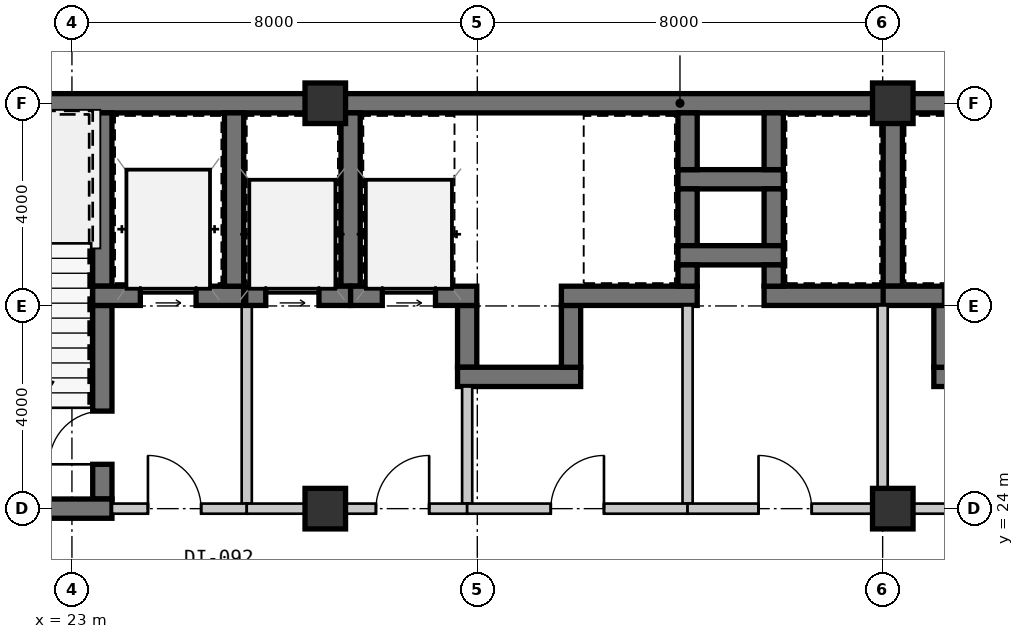
"""IFC4 building model, lengths in metres.
Left out: names, types, materials, properties, quantities, classifications, styles, units other than length and angle.
Written with IfcOpenShell. Run it as: python <this file> out.ifc"""

import sys

from ifc_helpers import new_model, si_unit, direction, frame, frame_2d, origin, origin_2d, place, context, subcontext, project, spatial, rectangle, extrude, source, transform, mapped, element, fill, save


model = new_model("IFC4")
c1 = context("Model", 3, precision=1e-05, world=origin(), true_north=direction((0.0, 1.0)))
c2 = subcontext(c1, "Body", "Model", "MODEL_VIEW")
j1 = project(units=[si_unit("LENGTHUNIT", "METRE"), si_unit("PLANEANGLEUNIT", "RADIAN")], contexts=[c1])
p1 = place(None, origin())
s1 = spatial("IfcSite", under=j1, at=p1, CompositionType="ELEMENT")
p2 = place(p1, origin())
s2 = spatial("IfcBuilding", under=s1, at=p2, CompositionType="ELEMENT")
p3 = place(p2, frame((0.0, 0.0, 19.95)))
s3 = spatial("IfcBuildingStorey", under=s2, at=p3, CompositionType="ELEMENT", Elevation=19.95)
m1 = source(origin(), c2, "Body", "SweptSolid", [
    extrude(rectangle(XDim=0.8, YDim=0.8, at=origin_2d()), origin(), (0.0, 0.0, 1.0), 3.15),
])
for number, where, z_axis, x_axis in (
    (1, (28.0, 24.0, 0.0), (0.0, 0.0, 1.0), (1.0, 0.0, 0.0)),
    (2, (39.2, 24.0, 0.0), (0.0, 0.0, 1.0), (1.0, 0.0, 0.0)),
    (3, (28.0, 32.0, 0.0), (0.0, 0.0, 1.0), (1.0, 0.0, 0.0)),
    (4, (39.2, 32.0, 0.0), (0.0, 0.0, 1.0), (1.0, 0.0, 0.0)),
):
    element("IfcColumn", number, at=place(p3, frame(where, z_axis=z_axis, x_axis=x_axis)), inside=s3, PredefinedType="COLUMN", context=c2, shape_type="MappedRepresentation", body=[
        mapped(m1, transform((0.0, 0.0, 0.0), scale=1.0)),
    ])
m2 = source(origin(), c2, "Body", "SweptSolid", [
    extrude(rectangle(XDim=9.19, YDim=0.38, at=frame_2d((4.595, 0.0))), origin(), (0.0, 0.0, 1.0), 2.93),
])
p4 = place(p3, frame((18.81, 32.0, 0.0), z_axis=(0.0, 0.0, 1.0), x_axis=(1.0, 0.0, 0.0)))
e5 = element("IfcWall", 5, at=p4, inside=s3, PredefinedType="SHEAR", context=c2, shape_type="MappedRepresentation", body=[
    mapped(m2, transform((0.0, 0.0, 0.0), scale=1.0)),
])
m3 = source(origin(), c2, "Body", "SweptSolid", [
    extrude(rectangle(XDim=11.2, YDim=0.38, at=frame_2d((5.6, 0.0))), origin(), (0.0, 0.0, 1.0), 2.93),
])
p5 = place(p3, frame((28.0, 32.0, 0.0), z_axis=(0.0, 0.0, 1.0), x_axis=(1.0, 0.0, 0.0)))
e6 = element("IfcWall", 6, at=p5, inside=s3, PredefinedType="SHEAR", context=c2, shape_type="MappedRepresentation", body=[
    mapped(m3, transform((0.0, 0.0, 0.0), scale=1.0)),
])
m4 = source(origin(), c2, "Body", "SweptSolid", [
    extrude(rectangle(XDim=11.99, YDim=0.38, at=frame_2d((5.995, 0.0))), origin(), (0.0, 0.0, 1.0), 2.93),
])
p6 = place(p3, frame((39.2, 32.0, 0.0), z_axis=(0.0, 0.0, 1.0), x_axis=(1.0, 0.0, 0.0)))
e7 = element("IfcWall", 7, at=p6, inside=s3, PredefinedType="SHEAR", context=c2, shape_type="MappedRepresentation", body=[
    mapped(m4, transform((0.0, 0.0, 0.0), scale=1.0)),
])
m5 = source(origin(), c2, "Body", "SweptSolid", [
    extrude(rectangle(XDim=3.42, YDim=0.38, at=frame_2d((1.71, 0.0))), origin(), (0.0, 0.0, 1.0), 2.93),
])
p7 = place(p3, frame((23.6, 28.39, 0.0), z_axis=(0.0, 0.0, 1.0), x_axis=(0.0, 1.0, 0.0)))
e8 = element("IfcWall", 8, at=p7, inside=s3, PredefinedType="SHEAR", context=c2, shape_type="MappedRepresentation", body=[
    mapped(m5, transform((0.0, 0.0, 0.0), scale=1.0)),
])
m6 = source(origin(), c2, "Body", "SweptSolid", [
    extrude(rectangle(XDim=3.82, YDim=0.38, at=frame_2d((1.91, 0.0))), origin(), (0.0, 0.0, 1.0), 2.93),
])
p8 = place(p3, frame((23.6, 24.19, 0.0), z_axis=(0.0, 0.0, 1.0), x_axis=(0.0, 1.0, 0.0)))
e9 = element("IfcWall", 9, at=p8, inside=s3, PredefinedType="SHEAR", context=c2, shape_type="MappedRepresentation", body=[
    mapped(m6, transform((0.0, 0.0, 0.0), scale=1.0)),
])
m7 = source(origin(), c2, "Body", "SweptSolid", [
    extrude(rectangle(XDim=1.05, YDim=2.1, at=frame_2d((0.525, 1.05))), frame((0.0, 0.2, 0.0), z_axis=(0.0, -1.0, 0.0), x_axis=(1.0, 0.0, 0.0)), (0.0, 0.0, 1.0), 0.4),
])
p9 = place(p8, frame((0.685, 0.0, 0.0)))
e10 = element("IfcOpeningElement", 10, at=p9, cuts=e9, PredefinedType="OPENING", context=c2, shape_type="MappedRepresentation", body=[
    mapped(m7, transform((0.0, 0.0, 0.0), scale=1.0)),
])
m8 = source(origin(), c2, "Body", "SweptSolid", [
    extrude(rectangle(XDim=4.98, YDim=0.38, at=frame_2d((2.49, 0.0))), origin(), (0.0, 0.0, 1.0), 2.93),
])
p10 = place(p3, frame((18.81, 24.0, 0.0), z_axis=(0.0, 0.0, 1.0), x_axis=(1.0, 0.0, 0.0)))
e11 = element("IfcWall", 11, at=p10, inside=s3, PredefinedType="SHEAR", context=c2, shape_type="MappedRepresentation", body=[
    mapped(m8, transform((0.0, 0.0, 0.0), scale=1.0)),
])
m9 = source(origin(), c2, "Body", "SweptSolid", [
    extrude(rectangle(XDim=2.98, YDim=0.38, at=frame_2d((1.49, 0.0))), origin(), (0.0, 0.0, 1.0), 2.93),
])
p11 = place(p3, frame((23.41, 28.2, 0.0), z_axis=(0.0, 0.0, 1.0), x_axis=(1.0, 0.0, 0.0)))
e12 = element("IfcWall", 12, at=p11, inside=s3, PredefinedType="SHEAR", context=c2, shape_type="MappedRepresentation", body=[
    mapped(m9, transform((0.0, 0.0, 0.0), scale=1.0)),
])
m10 = source(origin(), c2, "Body", "SweptSolid", [
    extrude(rectangle(XDim=1.1, YDim=2.15, at=frame_2d((0.55, 1.075))), frame((0.0, 0.2, 0.0), z_axis=(0.0, -1.0, 0.0), x_axis=(1.0, 0.0, 0.0)), (0.0, 0.0, 1.0), 0.4),
])
p12 = place(p11, frame((0.94, 0.0, 0.0)))
e13 = element("IfcOpeningElement", 13, at=p12, cuts=e12, PredefinedType="OPENING", context=c2, shape_type="MappedRepresentation", body=[
    mapped(m10, transform((0.0, 0.0, 0.0), scale=1.0)),
])
p13 = place(p3, frame((26.2, 28.39, 0.0), z_axis=(0.0, 0.0, 1.0), x_axis=(0.0, 1.0, 0.0)))
e14 = element("IfcWall", 14, at=p13, inside=s3, PredefinedType="SHEAR", context=c2, shape_type="MappedRepresentation", body=[
    mapped(m5, transform((0.0, 0.0, 0.0), scale=1.0)),
])
m11 = source(origin(), c2, "Body", "SweptSolid", [
    extrude(rectangle(XDim=3.91, YDim=0.2, at=frame_2d((1.955, 0.0))), origin(), (0.0, 0.0, 1.0), 2.93),
])
p14 = place(p3, frame((26.45, 24.1, 0.0), z_axis=(0.0, 0.0, 1.0), x_axis=(0.0, 1.0, 0.0)))
e15 = element("IfcWall", 15, at=p14, inside=s3, PredefinedType="SOLIDWALL", context=c2, shape_type="MappedRepresentation", body=[
    mapped(m11, transform((0.0, 0.0, 0.0), scale=1.0)),
])
m12 = source(origin(), c2, "Body", "SweptSolid", [
    extrude(rectangle(XDim=2.66, YDim=0.2, at=frame_2d((1.33, 0.0))), origin(), (0.0, 0.0, 1.0), 2.47),
])
p15 = place(p3, frame((23.79, 24.0, 0.0), z_axis=(0.0, 0.0, 1.0), x_axis=(1.0, 0.0, 0.0)))
e16 = element("IfcWall", 16, at=p15, inside=s3, PredefinedType="SOLIDWALL", context=c2, shape_type="MappedRepresentation", body=[
    mapped(m12, transform((0.0, 0.0, 0.0), scale=1.0)),
])
m13 = source(origin(), c2, "Body", "SweptSolid", [
    extrude(rectangle(XDim=1.05, YDim=2.1, at=frame_2d((0.525, 1.05))), frame((0.0, 0.11, 0.0), z_axis=(0.0, -1.0, 0.0), x_axis=(1.0, 0.0, 0.0)), (0.0, 0.0, 1.0), 0.22),
])
p16 = place(p15, frame((0.71, 0.0, 0.0)))
e17 = element("IfcOpeningElement", 17, at=p16, cuts=e16, PredefinedType="OPENING", context=c2, shape_type="MappedRepresentation", body=[
    mapped(m13, transform((0.0, 0.0, 0.0), scale=1.0)),
])
m14 = source(origin(), c2, "Body", "SweptSolid", [
    extrude(rectangle(XDim=2.08, YDim=0.38, at=frame_2d((1.04, 0.0))), origin(), (0.0, 0.0, 1.0), 2.93),
])
p17 = place(p3, frame((34.96, 30.5, 0.0), z_axis=(0.0, 0.0, 1.0), x_axis=(1.0, 0.0, 0.0)))
e18 = element("IfcWall", 18, at=p17, inside=s3, PredefinedType="SHEAR", context=c2, shape_type="MappedRepresentation", body=[
    mapped(m14, transform((0.0, 0.0, 0.0), scale=1.0)),
])
m15 = source(origin(), c2, "Body", "SweptSolid", [
    extrude(rectangle(XDim=1.12, YDim=0.38, at=frame_2d((0.56, 0.0))), origin(), (0.0, 0.0, 1.0), 2.93),
])
for number, where, z_axis, x_axis in (
    (19, (35.15, 31.81, 0.0), (0.0, 0.0, 1.0), (0.0, -1.0, 0.0)),
    (20, (36.85, 30.69, 0.0), (0.0, 0.0, 1.0), (0.0, 1.0, 0.0)),
    (21, (35.15, 30.31, 0.0), (0.0, 0.0, 1.0), (0.0, -1.0, 0.0)),
    (22, (36.85, 29.19, 0.0), (0.0, 0.0, 1.0), (0.0, 1.0, 0.0)),
):
    element("IfcWall", number, at=place(p3, frame(where, z_axis=z_axis, x_axis=x_axis)), inside=s3, PredefinedType="SHEAR", context=c2, shape_type="MappedRepresentation", body=[
        mapped(m15, transform((0.0, 0.0, 0.0), scale=1.0)),
    ])
p18 = place(p3, frame((34.96, 29.0, 0.0), z_axis=(0.0, 0.0, 1.0), x_axis=(1.0, 0.0, 0.0)))
e23 = element("IfcWall", 23, at=p18, inside=s3, PredefinedType="SHEAR", context=c2, shape_type="MappedRepresentation", body=[
    mapped(m14, transform((0.0, 0.0, 0.0), scale=1.0)),
])
m16 = source(origin(), c2, "Body", "SweptSolid", [
    extrude(rectangle(XDim=1.22, YDim=0.38, at=frame_2d((0.61, 0.0))), origin(), (0.0, 0.0, 1.0), 2.93),
])
p19 = place(p3, frame((30.8, 28.01, 0.0), z_axis=(0.0, 0.0, 1.0), x_axis=(0.0, -1.0, 0.0)))
e24 = element("IfcWall", 24, at=p19, inside=s3, PredefinedType="SHEAR", context=c2, shape_type="MappedRepresentation", body=[
    mapped(m16, transform((0.0, 0.0, 0.0), scale=1.0)),
])
m17 = source(origin(), c2, "Body", "SweptSolid", [
    extrude(rectangle(XDim=2.43, YDim=0.38, at=frame_2d((1.215, 0.0))), origin(), (0.0, 0.0, 1.0), 2.93),
])
p20 = place(p3, frame((30.61, 26.6, 0.0), z_axis=(0.0, 0.0, 1.0), x_axis=(1.0, 0.0, 0.0)))
e25 = element("IfcWall", 25, at=p20, inside=s3, PredefinedType="SHEAR", context=c2, shape_type="MappedRepresentation", body=[
    mapped(m17, transform((0.0, 0.0, 0.0), scale=1.0)),
])
p21 = place(p3, frame((32.85, 26.79, 0.0), z_axis=(0.0, 0.0, 1.0), x_axis=(0.0, 1.0, 0.0)))
e26 = element("IfcWall", 26, at=p21, inside=s3, PredefinedType="SHEAR", context=c2, shape_type="MappedRepresentation", body=[
    mapped(m16, transform((0.0, 0.0, 0.0), scale=1.0)),
])
m18 = source(origin(), c2, "Body", "SweptSolid", [
    extrude(rectangle(XDim=1.32, YDim=0.38, at=frame_2d((0.66, 0.0))), origin(), (0.0, 0.0, 1.0), 2.93),
])
p22 = place(p3, frame((41.52, 28.2, 0.0), z_axis=(0.0, 0.0, 1.0), x_axis=(-1.0, 0.0, 0.0)))
e27 = element("IfcWall", 27, at=p22, inside=s3, PredefinedType="SHEAR", context=c2, shape_type="MappedRepresentation", body=[
    mapped(m18, transform((0.0, 0.0, 0.0), scale=1.0)),
])
m19 = source(origin(), c2, "Body", "SweptSolid", [
    extrude(rectangle(XDim=2.33, YDim=0.38, at=frame_2d((1.165, 0.0))), origin(), (0.0, 0.0, 1.0), 2.93),
])
p23 = place(p3, frame((40.01, 26.6, 0.0), z_axis=(0.0, 0.0, 1.0), x_axis=(1.0, 0.0, 0.0)))
e28 = element("IfcWall", 28, at=p23, inside=s3, PredefinedType="SHEAR", context=c2, shape_type="MappedRepresentation", body=[
    mapped(m19, transform((0.0, 0.0, 0.0), scale=1.0)),
])
p24 = place(p3, frame((40.2, 28.01, 0.0), z_axis=(0.0, 0.0, 1.0), x_axis=(0.0, -1.0, 0.0)))
e29 = element("IfcWall", 29, at=p24, inside=s3, PredefinedType="SHEAR", context=c2, shape_type="MappedRepresentation", body=[
    mapped(m16, transform((0.0, 0.0, 0.0), scale=1.0)),
])
p25 = place(p3, frame((28.5, 28.39, 0.0), z_axis=(0.0, 0.0, 1.0), x_axis=(0.0, 1.0, 0.0)))
e30 = element("IfcWall", 30, at=p25, inside=s3, PredefinedType="SHEAR", context=c2, shape_type="MappedRepresentation", body=[
    mapped(m5, transform((0.0, 0.0, 0.0), scale=1.0)),
])
m20 = source(origin(), c2, "Body", "SweptSolid", [
    extrude(rectangle(XDim=2.07, YDim=0.38, at=frame_2d((1.035, 0.0))), origin(), (0.0, 0.0, 1.0), 2.93),
])
p26 = place(p3, frame((26.43, 28.2, 0.0), z_axis=(0.0, 0.0, 1.0), x_axis=(1.0, 0.0, 0.0)))
e31 = element("IfcWall", 31, at=p26, inside=s3, PredefinedType="SHEAR", context=c2, shape_type="MappedRepresentation", body=[
    mapped(m20, transform((0.0, 0.0, 0.0), scale=1.0)),
])
m21 = source(origin(), c2, "Body", "SweptSolid", [
    extrude(rectangle(XDim=1.05, YDim=2.15, at=frame_2d((0.525, 1.075))), frame((0.0, 0.2, 0.0), z_axis=(0.0, -1.0, 0.0), x_axis=(1.0, 0.0, 0.0)), (0.0, 0.0, 1.0), 0.4),
])
p27 = place(p26, frame((0.395, 0.0, 0.0)))
e32 = element("IfcOpeningElement", 32, at=p27, cuts=e31, PredefinedType="OPENING", context=c2, shape_type="MappedRepresentation", body=[
    mapped(m21, transform((0.0, 0.0, 0.0), scale=1.0)),
])
m22 = source(origin(), c2, "Body", "SweptSolid", [
    extrude(rectangle(XDim=2.49, YDim=0.38, at=frame_2d((1.245, 0.0))), origin(), (0.0, 0.0, 1.0), 2.93),
])
p28 = place(p3, frame((28.5, 28.2, 0.0), z_axis=(0.0, 0.0, 1.0), x_axis=(1.0, 0.0, 0.0)))
e33 = element("IfcWall", 33, at=p28, inside=s3, PredefinedType="SHEAR", context=c2, shape_type="MappedRepresentation", body=[
    mapped(m22, transform((0.0, 0.0, 0.0), scale=1.0)),
])
p29 = place(p28, frame((0.625, 0.0, 0.0)))
e34 = element("IfcOpeningElement", 34, at=p29, cuts=e33, PredefinedType="OPENING", context=c2, shape_type="MappedRepresentation", body=[
    mapped(m21, transform((0.0, 0.0, 0.0), scale=1.0)),
])
m23 = source(origin(), c2, "Body", "SweptSolid", [
    extrude(rectangle(XDim=2.31, YDim=0.2, at=frame_2d((1.155, 0.0))), origin(), (0.0, 0.0, 1.0), 2.93),
])
p30 = place(p3, frame((30.8, 26.41, 0.0), z_axis=(0.0, 0.0, 1.0), x_axis=(0.0, -1.0, 0.0)))
e35 = element("IfcWall", 35, at=p30, inside=s3, PredefinedType="SOLIDWALL", context=c2, shape_type="MappedRepresentation", body=[
    mapped(m23, transform((0.0, 0.0, 0.0), scale=1.0)),
])
m24 = source(origin(), c2, "Body", "SweptSolid", [
    extrude(rectangle(XDim=4.35, YDim=0.2, at=frame_2d((2.175, 0.0))), origin(), (0.0, 0.0, 1.0), 2.47),
])
p31 = place(p3, frame((30.8, 24.0, 0.0), z_axis=(0.0, 0.0, 1.0), x_axis=(-1.0, 0.0, 0.0)))
e36 = element("IfcWall", 36, at=p31, inside=s3, PredefinedType="SOLIDWALL", context=c2, shape_type="MappedRepresentation", body=[
    mapped(m24, transform((0.0, 0.0, 0.0), scale=1.0)),
])
p32 = place(p31, frame((0.75, 0.0, 0.0)))
e37 = element("IfcOpeningElement", 37, at=p32, cuts=e36, PredefinedType="OPENING", context=c2, shape_type="MappedRepresentation", body=[
    mapped(m13, transform((0.0, 0.0, 0.0), scale=1.0)),
])
m25 = source(origin(), c2, "Body", "SweptSolid", [
    extrude(rectangle(XDim=2.68, YDim=0.38, at=frame_2d((1.34, 0.0))), origin(), (0.0, 0.0, 1.0), 2.93),
])
p33 = place(p3, frame((32.66, 28.2, 0.0), z_axis=(0.0, 0.0, 1.0), x_axis=(1.0, 0.0, 0.0)))
e38 = element("IfcWall", 38, at=p33, inside=s3, PredefinedType="SHEAR", context=c2, shape_type="MappedRepresentation", body=[
    mapped(m25, transform((0.0, 0.0, 0.0), scale=1.0)),
])
m26 = source(origin(), c2, "Body", "SweptSolid", [
    extrude(rectangle(XDim=0.42, YDim=0.38, at=frame_2d((0.21, 0.0))), origin(), (0.0, 0.0, 1.0), 2.93),
])
p34 = place(p3, frame((35.15, 28.39, 0.0), z_axis=(0.0, 0.0, 1.0), x_axis=(0.0, 1.0, 0.0)))
e39 = element("IfcWall", 39, at=p34, inside=s3, PredefinedType="SHEAR", context=c2, shape_type="MappedRepresentation", body=[
    mapped(m26, transform((0.0, 0.0, 0.0), scale=1.0)),
])
p35 = place(p3, frame((39.2, 28.39, 0.0), z_axis=(0.0, 0.0, 1.0), x_axis=(0.0, 1.0, 0.0)))
e40 = element("IfcWall", 40, at=p35, inside=s3, PredefinedType="SHEAR", context=c2, shape_type="MappedRepresentation", body=[
    mapped(m5, transform((0.0, 0.0, 0.0), scale=1.0)),
])
m27 = source(origin(), c2, "Body", "SweptSolid", [
    extrude(rectangle(XDim=2.36, YDim=0.38, at=frame_2d((1.18, 0.0))), origin(), (0.0, 0.0, 1.0), 2.93),
])
p36 = place(p3, frame((36.66, 28.2, 0.0), z_axis=(0.0, 0.0, 1.0), x_axis=(1.0, 0.0, 0.0)))
e41 = element("IfcWall", 41, at=p36, inside=s3, PredefinedType="SHEAR", context=c2, shape_type="MappedRepresentation", body=[
    mapped(m27, transform((0.0, 0.0, 0.0), scale=1.0)),
])
p37 = place(p3, frame((36.85, 28.81, 0.0), z_axis=(0.0, 0.0, 1.0), x_axis=(0.0, -1.0, 0.0)))
e42 = element("IfcWall", 42, at=p37, inside=s3, PredefinedType="SHEAR", context=c2, shape_type="MappedRepresentation", body=[
    mapped(m26, transform((0.0, 0.0, 0.0), scale=1.0)),
])
m28 = source(origin(), c2, "Body", "SweptSolid", [
    extrude(rectangle(XDim=1.21, YDim=0.38, at=frame_2d((0.605, 0.0))), origin(), (0.0, 0.0, 1.0), 2.93),
])
p38 = place(p3, frame((39.01, 28.2, 0.0), z_axis=(0.0, 0.0, 1.0), x_axis=(1.0, 0.0, 0.0)))
e43 = element("IfcWall", 43, at=p38, inside=s3, PredefinedType="SHEAR", context=c2, shape_type="MappedRepresentation", body=[
    mapped(m28, transform((0.0, 0.0, 0.0), scale=1.0)),
])
p39 = place(p3, frame((35.15, 28.01, 0.0), z_axis=(0.0, 0.0, 1.0), x_axis=(0.0, -1.0, 0.0)))
e44 = element("IfcWall", 44, at=p39, inside=s3, PredefinedType="SOLIDWALL", context=c2, shape_type="MappedRepresentation", body=[
    mapped(m11, transform((0.0, 0.0, 0.0), scale=1.0)),
])
m29 = source(origin(), c2, "Body", "SweptSolid", [
    extrude(rectangle(XDim=4.35, YDim=0.2, at=frame_2d((2.175, 0.0))), origin(), (0.0, 0.0, 1.0), 2.47),
])
p40 = place(p3, frame((35.15, 24.0, 0.0), z_axis=(0.0, 0.0, 1.0), x_axis=(-1.0, 0.0, 0.0)))
e45 = element("IfcWall", 45, at=p40, inside=s3, PredefinedType="SOLIDWALL", context=c2, shape_type="MappedRepresentation", body=[
    mapped(m29, transform((0.0, 0.0, 0.0), scale=1.0)),
])
p41 = place(p40, frame((1.65, 0.0, 0.0)))
e46 = element("IfcOpeningElement", 46, at=p41, cuts=e45, PredefinedType="OPENING", context=c2, shape_type="MappedRepresentation", body=[
    mapped(m13, transform((0.0, 0.0, 0.0), scale=1.0)),
])
p42 = place(p3, frame((39.0, 28.01, 0.0), z_axis=(0.0, 0.0, 1.0), x_axis=(0.0, -1.0, 0.0)))
e47 = element("IfcWall", 47, at=p42, inside=s3, PredefinedType="SOLIDWALL", context=c2, shape_type="MappedRepresentation", body=[
    mapped(m11, transform((0.0, 0.0, 0.0), scale=1.0)),
])
m30 = source(origin(), c2, "Body", "SweptSolid", [
    extrude(rectangle(XDim=3.85, YDim=0.2, at=frame_2d((1.925, 0.0))), origin(), (0.0, 0.0, 1.0), 2.47),
])
p43 = place(p3, frame((39.0, 24.0, 0.0), z_axis=(0.0, 0.0, 1.0), x_axis=(-1.0, 0.0, 0.0)))
e48 = element("IfcWall", 48, at=p43, inside=s3, PredefinedType="SOLIDWALL", context=c2, shape_type="MappedRepresentation", body=[
    mapped(m30, transform((0.0, 0.0, 0.0), scale=1.0)),
])
p44 = place(p43, frame((1.4, 0.0, 0.0)))
e49 = element("IfcOpeningElement", 49, at=p44, cuts=e48, PredefinedType="OPENING", context=c2, shape_type="MappedRepresentation", body=[
    mapped(m13, transform((0.0, 0.0, 0.0), scale=1.0)),
])
m31 = source(origin(), c2, "Body", "SweptSolid", [
    extrude(rectangle(XDim=4.55, YDim=0.2, at=frame_2d((2.275, 0.0))), origin(), (0.0, 0.0, 1.0), 2.397),
])
p45 = place(p3, frame((43.55, 24.0, 0.0), z_axis=(0.0, 0.0, 1.0), x_axis=(-1.0, 0.0, 0.0)))
e50 = element("IfcWall", 50, at=p45, inside=s3, PredefinedType="SOLIDWALL", context=c2, shape_type="MappedRepresentation", body=[
    mapped(m31, transform((0.0, 0.0, 0.0), scale=1.0)),
])
p46 = place(p45, frame((1.75, 0.0, 0.0)))
e51 = element("IfcOpeningElement", 51, at=p46, cuts=e50, PredefinedType="OPENING", context=c2, shape_type="MappedRepresentation", body=[
    mapped(m13, transform((0.0, 0.0, 0.0), scale=1.0)),
])
m32 = source(origin(), c2, "Body", "SweptSolid", [
    extrude(rectangle(XDim=1.05, YDim=2.1, at=frame_2d((0.525, 1.05))), frame((0.0, 0.025, 0.0), z_axis=(0.0, -1.0, 0.0), x_axis=(1.0, 0.0, 0.0)), (0.0, 0.0, 1.0), 0.05),
])
p47 = place(p9, origin())
e52 = element("IfcDoor", 52, at=p47, inside=s3, OperationType="SINGLE_SWING_LEFT", PredefinedType="DOOR", context=c2, shape_type="MappedRepresentation", body=[
    mapped(m32, transform((0.0, 0.0, 0.0), scale=1.0)),
])
fill(e10, e52)
m33 = source(origin(), c2, "Body", "SweptSolid", [
    extrude(rectangle(XDim=1.1, YDim=2.15, at=frame_2d((0.55, 1.075))), frame((0.0, 0.025, 0.0), z_axis=(0.0, -1.0, 0.0), x_axis=(1.0, 0.0, 0.0)), (0.0, 0.0, 1.0), 0.05),
])
p48 = place(p12, origin())
e53 = element("IfcDoor", 53, at=p48, inside=s3, OperationType="SLIDING_TO_LEFT", PredefinedType="DOOR", context=c2, shape_type="MappedRepresentation", body=[
    mapped(m33, transform((0.0, 0.0, 0.0), scale=1.0)),
])
fill(e13, e53)
p49 = place(p16, origin())
e54 = element("IfcDoor", 54, at=p49, inside=s3, OperationType="SINGLE_SWING_LEFT", PredefinedType="DOOR", context=c2, shape_type="MappedRepresentation", body=[
    mapped(m32, transform((0.0, 0.0, 0.0), scale=1.0)),
])
fill(e17, e54)
m34 = source(origin(), c2, "Body", "SweptSolid", [
    extrude(rectangle(XDim=1.05, YDim=2.15, at=frame_2d((0.525, 1.075))), frame((0.0, 0.025, 0.0), z_axis=(0.0, -1.0, 0.0), x_axis=(1.0, 0.0, 0.0)), (0.0, 0.0, 1.0), 0.05),
])
p50 = place(p27, origin())
e55 = element("IfcDoor", 55, at=p50, inside=s3, OperationType="SLIDING_TO_LEFT", PredefinedType="DOOR", context=c2, shape_type="MappedRepresentation", body=[
    mapped(m34, transform((0.0, 0.0, 0.0), scale=1.0)),
])
fill(e32, e55)
p51 = place(p29, origin())
e56 = element("IfcDoor", 56, at=p51, inside=s3, OperationType="SLIDING_TO_LEFT", PredefinedType="DOOR", context=c2, shape_type="MappedRepresentation", body=[
    mapped(m34, transform((0.0, 0.0, 0.0), scale=1.0)),
])
fill(e34, e56)
p52 = place(p32, frame((1.05, 0.0, 0.0), z_axis=(0.0, 0.0, 1.0), x_axis=(-1.0, 0.0, 0.0)))
e57 = element("IfcDoor", 57, at=p52, inside=s3, OperationType="SINGLE_SWING_RIGHT", PredefinedType="DOOR", context=c2, shape_type="MappedRepresentation", body=[
    mapped(m32, transform((0.0, 0.0, 0.0), scale=1.0)),
])
fill(e37, e57)
p53 = place(p41, frame((1.05, 0.0, 0.0), z_axis=(0.0, 0.0, 1.0), x_axis=(-1.0, 0.0, 0.0)))
e58 = element("IfcDoor", 58, at=p53, inside=s3, OperationType="SINGLE_SWING_RIGHT", PredefinedType="DOOR", context=c2, shape_type="MappedRepresentation", body=[
    mapped(m32, transform((0.0, 0.0, 0.0), scale=1.0)),
])
fill(e46, e58)
p54 = place(p44, frame((1.05, 0.0, 0.0), z_axis=(0.0, 0.0, 1.0), x_axis=(-1.0, 0.0, 0.0)))
e59 = element("IfcDoor", 59, at=p54, inside=s3, OperationType="SINGLE_SWING_LEFT", PredefinedType="DOOR", context=c2, shape_type="MappedRepresentation", body=[
    mapped(m32, transform((0.0, 0.0, 0.0), scale=1.0)),
])
fill(e49, e59)
save(model, sys.argv[1])
